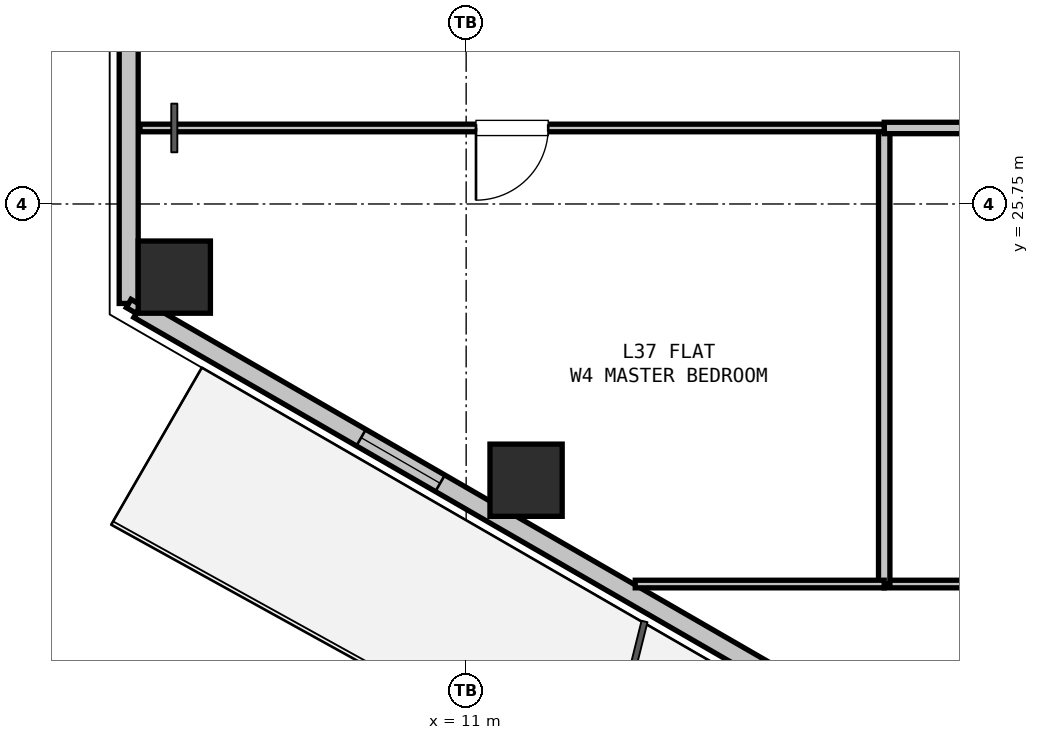
"""IFC4 building model, lengths in metres.
Left out: names, types, materials, properties, quantities, classifications, styles, units other than length and angle.
Written with IfcOpenShell. Run it as: python <this file> out.ifc"""

import sys

from ifc_helpers import new_model, si_unit, direction, frame, frame_2d, origin, origin_2d, place, context, subcontext, project, spatial, rectangle, hollow_rectangle, extrude, element, fill, save


model = new_model("IFC4")
c1 = context("Model", 3, precision=1e-05, world=origin(), true_north=direction((0.0, 1.0)))
c2 = subcontext(c1, "Body", "Model", "MODEL_VIEW")
j1 = project(units=[si_unit("LENGTHUNIT", "METRE"), si_unit("PLANEANGLEUNIT", "RADIAN")], contexts=[c1])
p1 = place(None, origin())
s1 = spatial("IfcSite", under=j1, at=p1, CompositionType="ELEMENT")
p2 = place(p1, origin())
s2 = spatial("IfcBuilding", under=s1, at=p2, CompositionType="ELEMENT")
p3 = place(p2, frame((0.0, 0.0, 134.4)))
s3 = spatial("IfcBuildingStorey", under=s2, at=p3, CompositionType="ELEMENT", Elevation=134.4)
for number, where, z_axis, x_axis in (
    (1, (11.788, 22.116, 0.0), (0.0, 0.0, 1.0), (1.0, 0.0, 0.0)),
    (2, (7.16, 24.788, 0.0), (0.0, 0.0, 1.0), (1.0, 0.0, 0.0)),
):
    element("IfcColumn", number, at=place(p3, frame(where, z_axis=z_axis, x_axis=x_axis)), inside=s3, PredefinedType="COLUMN", context=c2, shape_type="SweptSolid", body=[
        extrude(hollow_rectangle(XDim=0.95, YDim=0.95, WallThickness=0.028, at=origin_2d()), origin(), (0.0, 0.0, 1.0), 3.3),
    ])
p4 = place(p3, frame((6.56, 24.441, 0.0), z_axis=(0.0, 0.0, 1.0), x_axis=(0.0, 1.0, 0.0)))
e3 = element("IfcWall", 3, at=p4, inside=s3, PredefinedType="SOLIDWALL", context=c2, shape_type="SweptSolid", body=[
    extrude(rectangle(XDim=4.617, YDim=0.25, at=frame_2d((2.309, 0.0))), origin(), (0.0, 0.0, 1.0), 2.68),
])
p5 = place(p3, frame((16.378, 18.773, 0.0), z_axis=(0.0, 0.0, 1.0), x_axis=(-0.866027848477, 0.499995765644, 0.0)))
e4 = element("IfcWall", 4, at=p5, inside=s3, PredefinedType="SOLIDWALL", context=c2, shape_type="SweptSolid", body=[
    extrude(rectangle(XDim=11.186, YDim=0.25, at=frame_2d((5.593, 0.0))), origin(), (0.0, 0.0, 1.0), 2.68),
])
p6 = place(p5, frame((6.605, 0.0, 0.9)))
e5 = element("IfcOpeningElement", 5, at=p6, cuts=e4, PredefinedType="OPENING", context=c2, shape_type="SweptSolid", body=[
    extrude(rectangle(XDim=1.2, YDim=1.4, at=frame_2d((0.6, 0.7))), frame((0.0, 0.135, 0.0), z_axis=(0.0, -1.0, 0.0), x_axis=(1.0, 0.0, 0.0)), (0.0, 0.0, 1.0), 0.27),
])
p7 = place(p3, frame((20.0, 20.75, 0.0), z_axis=(0.0, 0.0, 1.0), x_axis=(-1.0, 0.0, 0.0)))
e6 = element("IfcWall", 6, at=p7, inside=s3, PredefinedType="PARTITIONING", context=c2, shape_type="SweptSolid", body=[
    extrude(rectangle(XDim=3.5, YDim=0.1, at=frame_2d((1.75, 0.0))), origin(), (0.0, 0.0, 1.0), 3.06),
])
p8 = place(p3, frame((16.5, 20.75, 0.0), z_axis=(0.0, 0.0, 1.0), x_axis=(0.0, 1.0, 0.0)))
e7 = element("IfcWall", 7, at=p8, inside=s3, PredefinedType="PARTITIONING", context=c2, shape_type="SweptSolid", body=[
    extrude(rectangle(XDim=6.0, YDim=0.15, at=frame_2d((3.0, 0.0))), origin(), (0.0, 0.0, 1.0), 2.433),
])
p9 = place(p3, frame((16.5, 26.75, 0.0), z_axis=(0.0, 0.0, 1.0), x_axis=(1.0, 0.0, 0.0)))
e8 = element("IfcWall", 8, at=p9, inside=s3, PredefinedType="PARTITIONING", context=c2, shape_type="SweptSolid", body=[
    extrude(rectangle(XDim=5.45, YDim=0.15, at=frame_2d((2.725, 0.0))), origin(), (0.0, 0.0, 1.0), 2.508),
])
p10 = place(p3, frame((16.5, 26.75, 0.0), z_axis=(0.0, 0.0, 1.0), x_axis=(-1.0, 0.0, 0.0)))
e9 = element("IfcWall", 9, at=p10, inside=s3, PredefinedType="PARTITIONING", context=c2, shape_type="SweptSolid", body=[
    extrude(rectangle(XDim=9.791, YDim=0.1, at=frame_2d((4.896, 0.0))), origin(), (0.0, 0.0, 1.0), 2.725),
])
p11 = place(p10, frame((4.42, 0.0, 0.0)))
e10 = element("IfcOpeningElement", 10, at=p11, cuts=e9, PredefinedType="OPENING", context=c2, shape_type="SweptSolid", body=[
    extrude(rectangle(XDim=0.95, YDim=2.1, at=frame_2d((0.475, 1.05))), frame((0.0, 0.06, 0.0), z_axis=(0.0, -1.0, 0.0), x_axis=(1.0, 0.0, 0.0)), (0.0, 0.0, 1.0), 0.12),
])
p12 = place(p3, frame((16.5, 20.75, 0.0), z_axis=(0.0, 0.0, 1.0), x_axis=(-1.0, 0.0, 0.0)))
e11 = element("IfcWall", 11, at=p12, inside=s3, PredefinedType="PARTITIONING", context=c2, shape_type="SweptSolid", body=[
    extrude(rectangle(XDim=3.275, YDim=0.1, at=frame_2d((1.638, 0.0))), origin(), (0.0, 0.0, 1.0), 2.365),
])
p13 = place(p3, frame((6.69, 24.366, 0.0), z_axis=(0.0, 0.0, 1.0), x_axis=(-0.866131372301, 0.499816412211, 0.0)))
e12 = element("IfcWall", 12, at=p13, inside=s3, PredefinedType="PARTITIONING", context=c2, shape_type="SweptSolid", body=[
    extrude(rectangle(XDim=0.15, YDim=0.125, at=frame_2d((0.075, 0.0))), origin(), (0.0, 0.0, 1.0), 3.06),
])
p14 = place(p6, origin())
e13 = element("IfcWindow", 13, at=p14, inside=s3, PartitioningType="SINGLE_PANEL", PredefinedType="WINDOW", context=c2, shape_type="SweptSolid", body=[
    extrude(rectangle(XDim=1.2, YDim=1.4, at=frame_2d((0.6, 0.7))), frame((0.0, 0.03, 0.0), z_axis=(0.0, -1.0, 0.0), x_axis=(1.0, 0.0, 0.0)), (0.0, 0.0, 1.0), 0.06),
])
fill(e5, e13)
p15 = place(p11, origin())
e14 = element("IfcDoor", 14, at=p15, inside=s3, OperationType="SINGLE_SWING_RIGHT", PredefinedType="DOOR", context=c2, shape_type="SweptSolid", body=[
    extrude(rectangle(XDim=0.95, YDim=2.1, at=frame_2d((0.475, 1.05))), frame((0.0, 0.025, 0.0), z_axis=(0.0, -1.0, 0.0), x_axis=(1.0, 0.0, 0.0)), (0.0, 0.0, 1.0), 0.05),
])
fill(e10, e14)
save(model, sys.argv[1])
